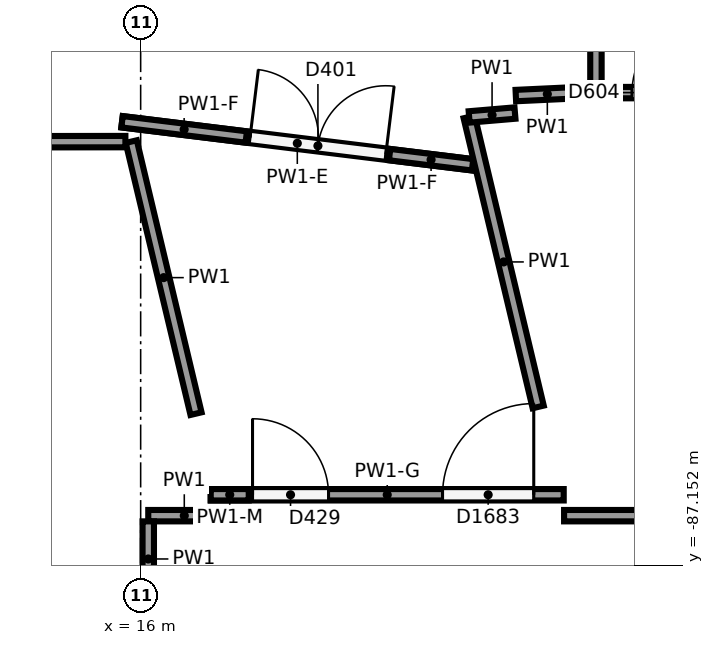
"""IFC4 building model, lengths in metres.
Left out: names, types, materials, properties, quantities, classifications, styles, units other than length and angle.
Written with IfcOpenShell. Run it as: python <this file> out.ifc"""

import sys

from ifc_helpers import new_model, si_unit, direction, frame, frame_2d, origin, origin_2d, place, context, subcontext, project, spatial, rectangle, circle, extrude, element, fill, save


model = new_model("IFC4")
c1 = context("Model", 3, precision=1e-05, world=origin(), true_north=direction((0.0, 1.0)))
c2 = subcontext(c1, "Body", "Model", "MODEL_VIEW")
j1 = project(units=[si_unit("LENGTHUNIT", "METRE"), si_unit("PLANEANGLEUNIT", "RADIAN")], contexts=[c1])
p1 = place(None, origin())
s1 = spatial("IfcSite", under=j1, at=p1, CompositionType="ELEMENT")
p2 = place(p1, origin())
s2 = spatial("IfcBuilding", under=s1, at=p2, CompositionType="ELEMENT")
p3 = place(p2, origin())
s3 = spatial("IfcBuildingStorey", under=s2, at=p3, CompositionType="ELEMENT", Elevation=0.0)
p4 = place(p3, frame((19.119, -85.698, 0.0), z_axis=(0.0, 0.0, 1.0), x_axis=(1.0, 0.0, 0.0)))
e1 = element("IfcColumn", 1, at=p4, inside=s3, PredefinedType="COLUMN", context=c2, shape_type="SweptSolid", body=[
    extrude(circle(Radius=0.4, at=origin_2d()), origin(), (0.0, 0.0, 1.0), 6.5),
])
p5 = place(p3, frame((15.876, -81.579, 0.0), z_axis=(0.0, 0.0, 1.0), x_axis=(0.231653421041, -0.972798382256, 0.0)))
e2 = element("IfcWall", 2, at=p5, inside=s3, PredefinedType="PARTITIONING", context=c2, shape_type="SweptSolid", body=[
    extrude(rectangle(XDim=3.679, YDim=0.15, at=frame_2d((1.84, 0.0))), origin(), (0.0, 0.0, 1.0), 6.15),
])
p6 = place(p3, frame((17.048, -86.5, 0.0), z_axis=(0.0, 0.0, 1.0), x_axis=(-1.0, 0.0, 0.0)))
e3 = element("IfcWall", 3, at=p6, inside=s3, PredefinedType="PARTITIONING", context=c2, shape_type="SweptSolid", body=[
    extrude(rectangle(XDim=0.948, YDim=0.15, at=frame_2d((0.474, 0.0))), origin(), (0.0, 0.0, 1.0), 6.15),
])
p7 = place(p3, frame((16.1, -86.575, 0.0), z_axis=(0.0, 0.0, 1.0), x_axis=(0.0, -1.0, 0.0)))
e4 = element("IfcWall", 4, at=p7, inside=s3, PredefinedType="PARTITIONING", context=c2, shape_type="SweptSolid", body=[
    extrude(rectangle(XDim=0.989, YDim=0.15, at=frame_2d((0.495, 0.0))), origin(), (0.0, 0.0, 1.0), 6.15),
])
p8 = place(p3, frame((6.538, -81.59, 0.0), z_axis=(0.0, 0.0, 1.0), x_axis=(0.99999932727, 0.001159939114, 0.0)))
e5 = element("IfcWall", 5, at=p8, inside=s3, PredefinedType="PARTITIONING", context=c2, shape_type="SweptSolid", body=[
    extrude(rectangle(XDim=9.261, YDim=0.15, at=frame_2d((4.63, 0.0))), origin(), (0.0, 0.0, 1.0), 6.15),
])
p9 = place(p3, frame((29.825, -86.5, 0.0), z_axis=(0.0, 0.0, 1.0), x_axis=(-1.0, 0.0, 0.0)))
e6 = element("IfcWall", 6, at=p9, inside=s3, PredefinedType="PARTITIONING", context=c2, shape_type="SweptSolid", body=[
    extrude(rectangle(XDim=8.254, YDim=0.15, at=frame_2d((4.127, 0.0))), origin(), (0.0, 0.0, 1.0), 6.15),
])
p10 = place(p3, frame((21.23, -85.069, 0.0), z_axis=(0.0, 0.0, 1.0), x_axis=(-0.231637359188, 0.972802206941, 0.0)))
e7 = element("IfcWall", 7, at=p10, inside=s3, PredefinedType="PARTITIONING", context=c2, shape_type="SweptSolid", body=[
    extrude(rectangle(XDim=3.922, YDim=0.15, at=frame_2d((1.961, 0.0))), origin(), (0.0, 0.0, 1.0), 6.15),
])
p11 = place(p3, frame((20.322, -81.254, 0.0), z_axis=(0.0, 0.0, 1.0), x_axis=(0.996439227691, 0.084314088497, 0.0)))
e8 = element("IfcWall", 8, at=p11, inside=s3, PredefinedType="PARTITIONING", context=c2, shape_type="SweptSolid", body=[
    extrude(rectangle(XDim=0.605, YDim=0.15, at=frame_2d((0.303, 0.0))), origin(), (0.0, 0.0, 1.0), 6.15),
])
p12 = place(p3, frame((20.936, -80.973, 0.0), z_axis=(0.0, 0.0, 1.0), x_axis=(0.998905752417, 0.046768555546, 0.0)))
e9 = element("IfcWall", 9, at=p12, inside=s3, PredefinedType="PARTITIONING", context=c2, shape_type="SweptSolid", body=[
    extrude(rectangle(XDim=0.83, YDim=0.15, at=frame_2d((0.415, 0.0))), origin(), (0.0, 0.0, 1.0), 6.15),
])
p13 = place(p3, frame((21.765, -80.934, 0.0), z_axis=(0.0, 0.0, 1.0), x_axis=(1.0, 0.0, 0.0)))
e10 = element("IfcWall", 10, at=p13, inside=s3, PredefinedType="PARTITIONING", context=c2, shape_type="SweptSolid", body=[
    extrude(rectangle(XDim=2.463, YDim=0.15, at=frame_2d((1.231, 0.0))), origin(), (0.0, 0.0, 1.0), 6.15),
])
p14 = place(p13, frame((0.7, 0.0, 0.0)))
e11 = element("IfcOpeningElement", 11, at=p14, cuts=e10, PredefinedType="OPENING", context=c2, shape_type="SweptSolid", body=[
    extrude(rectangle(XDim=1.0, YDim=2.1, at=frame_2d((0.5, 1.05))), frame((0.0, 0.085, 0.0), z_axis=(0.0, -1.0, 0.0), x_axis=(1.0, 0.0, 0.0)), (0.0, 0.0, 1.0), 0.17),
])
p15 = place(p3, frame((21.99, -80.859, 0.0), z_axis=(0.0, 0.0, 1.0), x_axis=(0.0, 1.0, 0.0)))
e12 = element("IfcWall", 12, at=p15, inside=s3, PredefinedType="PARTITIONING", context=c2, shape_type="SweptSolid", body=[
    extrude(rectangle(XDim=2.25, YDim=0.15, at=frame_2d((1.125, 0.0))), origin(), (0.0, 0.0, 1.0), 6.15),
])
p16 = place(p3, frame((16.922, -86.225, 0.0), z_axis=(0.0, 0.0, 1.0), x_axis=(1.0, 0.0, 0.0)))
e13 = element("IfcWall", 13, at=p16, inside=s3, PredefinedType="PARTITIONING", context=c2, shape_type="SweptSolid", body=[
    extrude(rectangle(XDim=4.644, YDim=0.15, at=frame_2d((2.322, 0.0))), origin(), (0.0, 0.0, 1.0), 5.4),
])
p17 = place(p16, frame((0.55, 0.0, 0.0)))
e14 = element("IfcOpeningElement", 14, at=p17, cuts=e13, PredefinedType="OPENING", context=c2, shape_type="SweptSolid", body=[
    extrude(rectangle(XDim=1.0, YDim=2.1, at=frame_2d((0.5, 1.05))), frame((0.0, 0.085, 0.0), z_axis=(0.0, -1.0, 0.0), x_axis=(1.0, 0.0, 0.0)), (0.0, 0.0, 1.0), 0.17),
])
p18 = place(p16, frame((3.05, 0.0, 0.0)))
e15 = element("IfcOpeningElement", 15, at=p18, cuts=e13, PredefinedType="OPENING", context=c2, shape_type="SweptSolid", body=[
    extrude(rectangle(XDim=1.2, YDim=2.1, at=frame_2d((0.6, 1.05))), frame((0.0, 0.085, 0.0), z_axis=(0.0, -1.0, 0.0), x_axis=(1.0, 0.0, 0.0)), (0.0, 0.0, 1.0), 0.17),
])
p19 = place(p3, frame((16.922, -86.225, 5.4), z_axis=(0.0, 0.0, 1.0), x_axis=(1.0, 0.0, 0.0)))
e16 = element("IfcWall", 16, at=p19, inside=s3, PredefinedType="PARTITIONING", context=c2, shape_type="SweptSolid", body=[
    extrude(rectangle(XDim=0.5, YDim=0.15, at=frame_2d((0.25, 0.0))), origin(), (0.0, 0.0, 1.0), 0.75),
])
p20 = place(p3, frame((15.755, -81.318, 0.0), z_axis=(0.0, 0.0, 1.0), x_axis=(0.992549476032, -0.12184226536, 0.0)))
e17 = element("IfcWall", 17, at=p20, inside=s3, PredefinedType="PARTITIONING", context=c2, shape_type="SweptSolid", body=[
    extrude(rectangle(XDim=4.647, YDim=0.15, at=frame_2d((2.323, 0.0))), origin(), (0.0, 0.0, 1.0), 5.25),
])
p21 = place(p20, frame((1.697, 0.0, 0.0)))
e18 = element("IfcOpeningElement", 18, at=p21, cuts=e17, PredefinedType="OPENING", context=c2, shape_type="SweptSolid", body=[
    extrude(rectangle(XDim=1.8, YDim=2.1, at=frame_2d((0.9, 1.05))), frame((0.0, 0.085, 0.0), z_axis=(0.0, -1.0, 0.0), x_axis=(1.0, 0.0, 0.0)), (0.0, 0.0, 1.0), 0.17),
])
p22 = place(p3, frame((19.275, -81.75, 5.25), z_axis=(0.0, 0.0, 1.0), x_axis=(0.992548636292, -0.121849105842, 0.0)))
e19 = element("IfcWall", 19, at=p22, inside=s3, PredefinedType="PARTITIONING", context=c2, shape_type="SweptSolid", body=[
    extrude(rectangle(XDim=1.1, YDim=0.15, at=frame_2d((0.55, 0.0))), origin(), (0.0, 0.0, 1.0), 0.9),
])
p23 = place(p3, frame((15.755, -81.318, 5.25), z_axis=(0.0, 0.0, 1.0), x_axis=(0.992546916187, -0.121863116521, 0.0)))
e20 = element("IfcWall", 20, at=p23, inside=s3, PredefinedType="PARTITIONING", context=c2, shape_type="SweptSolid", body=[
    extrude(rectangle(XDim=1.647, YDim=0.15, at=frame_2d((0.823, 0.0))), origin(), (0.0, 0.0, 1.0), 0.9),
])
p24 = place(p14, origin())
e21 = element("IfcDoor", 21, at=p24, inside=s3, OperationType="SINGLE_SWING_RIGHT", PredefinedType="DOOR", context=c2, shape_type="SweptSolid", body=[
    extrude(rectangle(XDim=1.0, YDim=2.1, at=frame_2d((0.5, 1.05))), frame((0.0, 0.025, 0.0), z_axis=(0.0, -1.0, 0.0), x_axis=(1.0, 0.0, 0.0)), (0.0, 0.0, 1.0), 0.05),
])
fill(e11, e21)
p25 = place(p17, origin())
e22 = element("IfcDoor", 22, at=p25, inside=s3, OperationType="SINGLE_SWING_LEFT", PredefinedType="DOOR", context=c2, shape_type="SweptSolid", body=[
    extrude(rectangle(XDim=1.0, YDim=2.1, at=frame_2d((0.5, 1.05))), frame((0.0, 0.025, 0.0), z_axis=(0.0, -1.0, 0.0), x_axis=(1.0, 0.0, 0.0)), (0.0, 0.0, 1.0), 0.05),
])
fill(e14, e22)
p26 = place(p18, origin())
e23 = element("IfcDoor", 23, at=p26, inside=s3, OperationType="SINGLE_SWING_RIGHT", PredefinedType="DOOR", context=c2, shape_type="SweptSolid", body=[
    extrude(rectangle(XDim=1.2, YDim=2.1, at=frame_2d((0.6, 1.05))), frame((0.0, 0.025, 0.0), z_axis=(0.0, -1.0, 0.0), x_axis=(1.0, 0.0, 0.0)), (0.0, 0.0, 1.0), 0.05),
])
fill(e15, e23)
p27 = place(p21, origin())
e24 = element("IfcDoor", 24, at=p27, inside=s3, OperationType="DOUBLE_DOOR_SINGLE_SWING", PredefinedType="DOOR", context=c2, shape_type="SweptSolid", body=[
    extrude(rectangle(XDim=1.8, YDim=2.1, at=frame_2d((0.9, 1.05))), frame((0.0, 0.025, 0.0), z_axis=(0.0, -1.0, 0.0), x_axis=(1.0, 0.0, 0.0)), (0.0, 0.0, 1.0), 0.05),
])
fill(e18, e24)
save(model, sys.argv[1])
